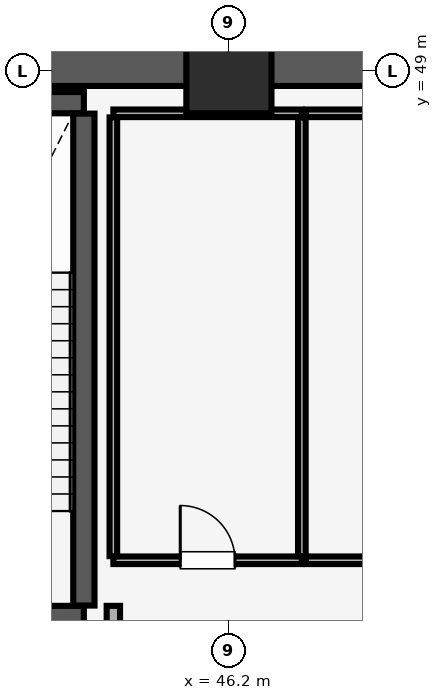
"""IFC4 building model, lengths in metres.
Left out: names, types, materials, properties, quantities, classifications, styles, units other than length and angle.
Written with IfcOpenShell. Run it as: python <this file> out.ifc"""

import sys

from ifc_helpers import new_model, si_unit, direction, frame, frame_2d, origin, origin_2d, place, context, subcontext, project, spatial, rectangle, extrude, element, fill, save


model = new_model("IFC4")
c1 = context("Model", 3, precision=1e-05, world=origin(), true_north=direction((0.0, 1.0)))
c2 = subcontext(c1, "Body", "Model", "MODEL_VIEW")
j1 = project(units=[si_unit("LENGTHUNIT", "METRE"), si_unit("PLANEANGLEUNIT", "RADIAN")], contexts=[c1])
p1 = place(None, origin())
s1 = spatial("IfcSite", under=j1, at=p1, CompositionType="ELEMENT")
p2 = place(p1, origin())
s2 = spatial("IfcBuilding", under=s1, at=p2, CompositionType="ELEMENT")
p3 = place(p2, frame((0.0, 0.0, 26.0)))
s3 = spatial("IfcBuildingStorey", under=s2, at=p3, CompositionType="ELEMENT", Elevation=26.0)
p4 = place(p3, frame((46.2, 49.0, 0.0), z_axis=(0.0, 0.0, 1.0), x_axis=(1.0, 0.0, 0.0)))
e1 = element("IfcColumn", 1, at=p4, inside=s3, PredefinedType="COLUMN", context=c2, shape_type="SweptSolid", body=[
    extrude(rectangle(XDim=1.4, YDim=1.4, at=origin_2d()), origin(), (0.0, 0.0, 1.0), 5.16),
])
p5 = place(p3, frame((16.2, 49.3, 0.0), z_axis=(0.0, 0.0, 1.0), x_axis=(1.0, 0.0, 0.0)))
e2 = element("IfcWall", 2, at=p5, inside=s3, PredefinedType="SHEAR", context=c2, shape_type="SweptSolid", body=[
    extrude(rectangle(XDim=51.6, YDim=1.1, at=frame_2d((25.8, 0.0))), origin(), (0.0, 0.0, 1.0), 5.12),
])
p6 = place(p3, frame((40.185, 40.025, 0.0), z_axis=(0.0, 0.0, 1.0), x_axis=(1.0, 0.0, 0.0)))
e3 = element("IfcWall", 3, at=p6, inside=s3, PredefinedType="SHEAR", context=c2, shape_type="SweptSolid", body=[
    extrude(rectangle(XDim=3.63, YDim=0.35, at=frame_2d((1.815, 0.0))), origin(), (0.0, 0.0, 1.0), 5.12),
])
p7 = place(p6, frame((1.24, 0.0, 0.0)))
e4 = element("IfcOpeningElement", 4, at=p7, cuts=e3, PredefinedType="OPENING", context=c2, shape_type="SweptSolid", body=[
    extrude(rectangle(XDim=1.15, YDim=2.15, at=frame_2d((0.575, 1.075))), frame((0.0, 0.185, 0.0), z_axis=(0.0, -1.0, 0.0), x_axis=(1.0, 0.0, 0.0)), (0.0, 0.0, 1.0), 0.37),
])
p8 = place(p3, frame((40.185, 48.475, 0.0), z_axis=(0.0, 0.0, 1.0), x_axis=(1.0, 0.0, 0.0)))
e5 = element("IfcWall", 5, at=p8, inside=s3, PredefinedType="SHEAR", context=c2, shape_type="SweptSolid", body=[
    extrude(rectangle(XDim=3.63, YDim=0.35, at=frame_2d((1.815, 0.0))), origin(), (0.0, 0.0, 1.0), 5.12),
])
p9 = place(p3, frame((43.815, 40.205, 0.0), z_axis=(0.0, 0.0, 1.0), x_axis=(0.0, 1.0, 0.0)))
e6 = element("IfcWall", 6, at=p9, inside=s3, PredefinedType="SHEAR", context=c2, shape_type="SweptSolid", body=[
    extrude(rectangle(XDim=8.09, YDim=0.35, at=frame_2d((4.045, 0.0))), origin(), (0.0, 0.0, 1.0), 5.12),
])
p10 = place(p3, frame((44.3, 34.415, 0.0), z_axis=(0.0, 0.0, 1.0), x_axis=(0.0, 1.0, 0.0)))
e7 = element("IfcWall", 7, at=p10, inside=s3, PredefinedType="PARTITIONING", context=c2, shape_type="SweptSolid", body=[
    extrude(rectangle(XDim=5.785, YDim=0.22, at=frame_2d((2.893, 0.0))), origin(), (0.0, 0.0, 1.0), 5.12),
])
p11 = place(p3, frame((44.3, 40.95, 0.0), z_axis=(0.0, 0.0, 1.0), x_axis=(1.0, 0.0, 0.0)))
e8 = element("IfcWall", 8, at=p11, inside=s3, PredefinedType="PARTITIONING", context=c2, shape_type="SweptSolid", body=[
    extrude(rectangle(XDim=3.1, YDim=0.125, at=frame_2d((1.55, 0.0))), origin(), (0.0, 0.0, 1.0), 5.12),
])
p12 = place(p11, frame((1.1, 0.0, 0.0)))
e9 = element("IfcOpeningElement", 9, at=p12, cuts=e8, PredefinedType="OPENING", context=c2, shape_type="SweptSolid", body=[
    extrude(rectangle(XDim=0.9, YDim=2.1, at=frame_2d((0.45, 1.05))), frame((0.0, 0.073, 0.0), z_axis=(0.0, -1.0, 0.0), x_axis=(1.0, 0.0, 0.0)), (0.0, 0.0, 1.0), 0.145),
])
p13 = place(p3, frame((44.3, 48.3, 0.0), z_axis=(0.0, 0.0, 1.0), x_axis=(1.0, 0.0, 0.0)))
e10 = element("IfcWall", 10, at=p13, inside=s3, PredefinedType="PARTITIONING", context=c2, shape_type="SweptSolid", body=[
    extrude(rectangle(XDim=3.1, YDim=0.125, at=frame_2d((1.55, 0.0))), origin(), (0.0, 0.0, 1.0), 5.12),
])
for number, where, z_axis, x_axis in (
    (11, (44.3, 41.018, 0.0), (0.0, 0.0, 1.0), (0.0, 1.0, 0.0)),
    (12, (47.4, 41.018, 0.0), (0.0, 0.0, 1.0), (0.0, 1.0, 0.0)),
):
    element("IfcWall", number, at=place(p3, frame(where, z_axis=z_axis, x_axis=x_axis)), inside=s3, PredefinedType="PARTITIONING", context=c2, shape_type="SweptSolid", body=[
        extrude(rectangle(XDim=7.215, YDim=0.125, at=frame_2d((3.607, 0.0))), origin(), (0.0, 0.0, 1.0), 5.12),
    ])
p14 = place(p3, frame((47.468, 40.95, 0.0), z_axis=(0.0, 0.0, 1.0), x_axis=(1.0, 0.0, 0.0)))
e13 = element("IfcWall", 13, at=p14, inside=s3, PredefinedType="PARTITIONING", context=c2, shape_type="SweptSolid", body=[
    extrude(rectangle(XDim=4.932, YDim=0.125, at=frame_2d((2.466, 0.0))), origin(), (0.0, 0.0, 1.0), 5.12),
])
p15 = place(p14, frame((1.982, 0.0, 0.0)))
e14 = element("IfcOpeningElement", 14, at=p15, cuts=e13, PredefinedType="OPENING", context=c2, shape_type="SweptSolid", body=[
    extrude(rectangle(XDim=0.9, YDim=2.1, at=frame_2d((0.45, 1.05))), frame((0.0, 0.073, 0.0), z_axis=(0.0, -1.0, 0.0), x_axis=(1.0, 0.0, 0.0)), (0.0, 0.0, 1.0), 0.145),
])
p16 = place(p3, frame((47.468, 48.3, 0.0), z_axis=(0.0, 0.0, 1.0), x_axis=(1.0, 0.0, 0.0)))
e15 = element("IfcWall", 15, at=p16, inside=s3, PredefinedType="PARTITIONING", context=c2, shape_type="SweptSolid", body=[
    extrude(rectangle(XDim=4.932, YDim=0.125, at=frame_2d((2.466, 0.0))), origin(), (0.0, 0.0, 1.0), 5.12),
])
p17 = place(p12, origin())
e16 = element("IfcDoor", 16, at=p17, inside=s3, OperationType="SINGLE_SWING_LEFT", PredefinedType="DOOR", context=c2, shape_type="SweptSolid", body=[
    extrude(rectangle(XDim=0.9, YDim=2.1, at=frame_2d((0.45, 1.05))), frame((0.0, 0.025, 0.0), z_axis=(0.0, -1.0, 0.0), x_axis=(1.0, 0.0, 0.0)), (0.0, 0.0, 1.0), 0.05),
])
fill(e9, e16)
save(model, sys.argv[1])
